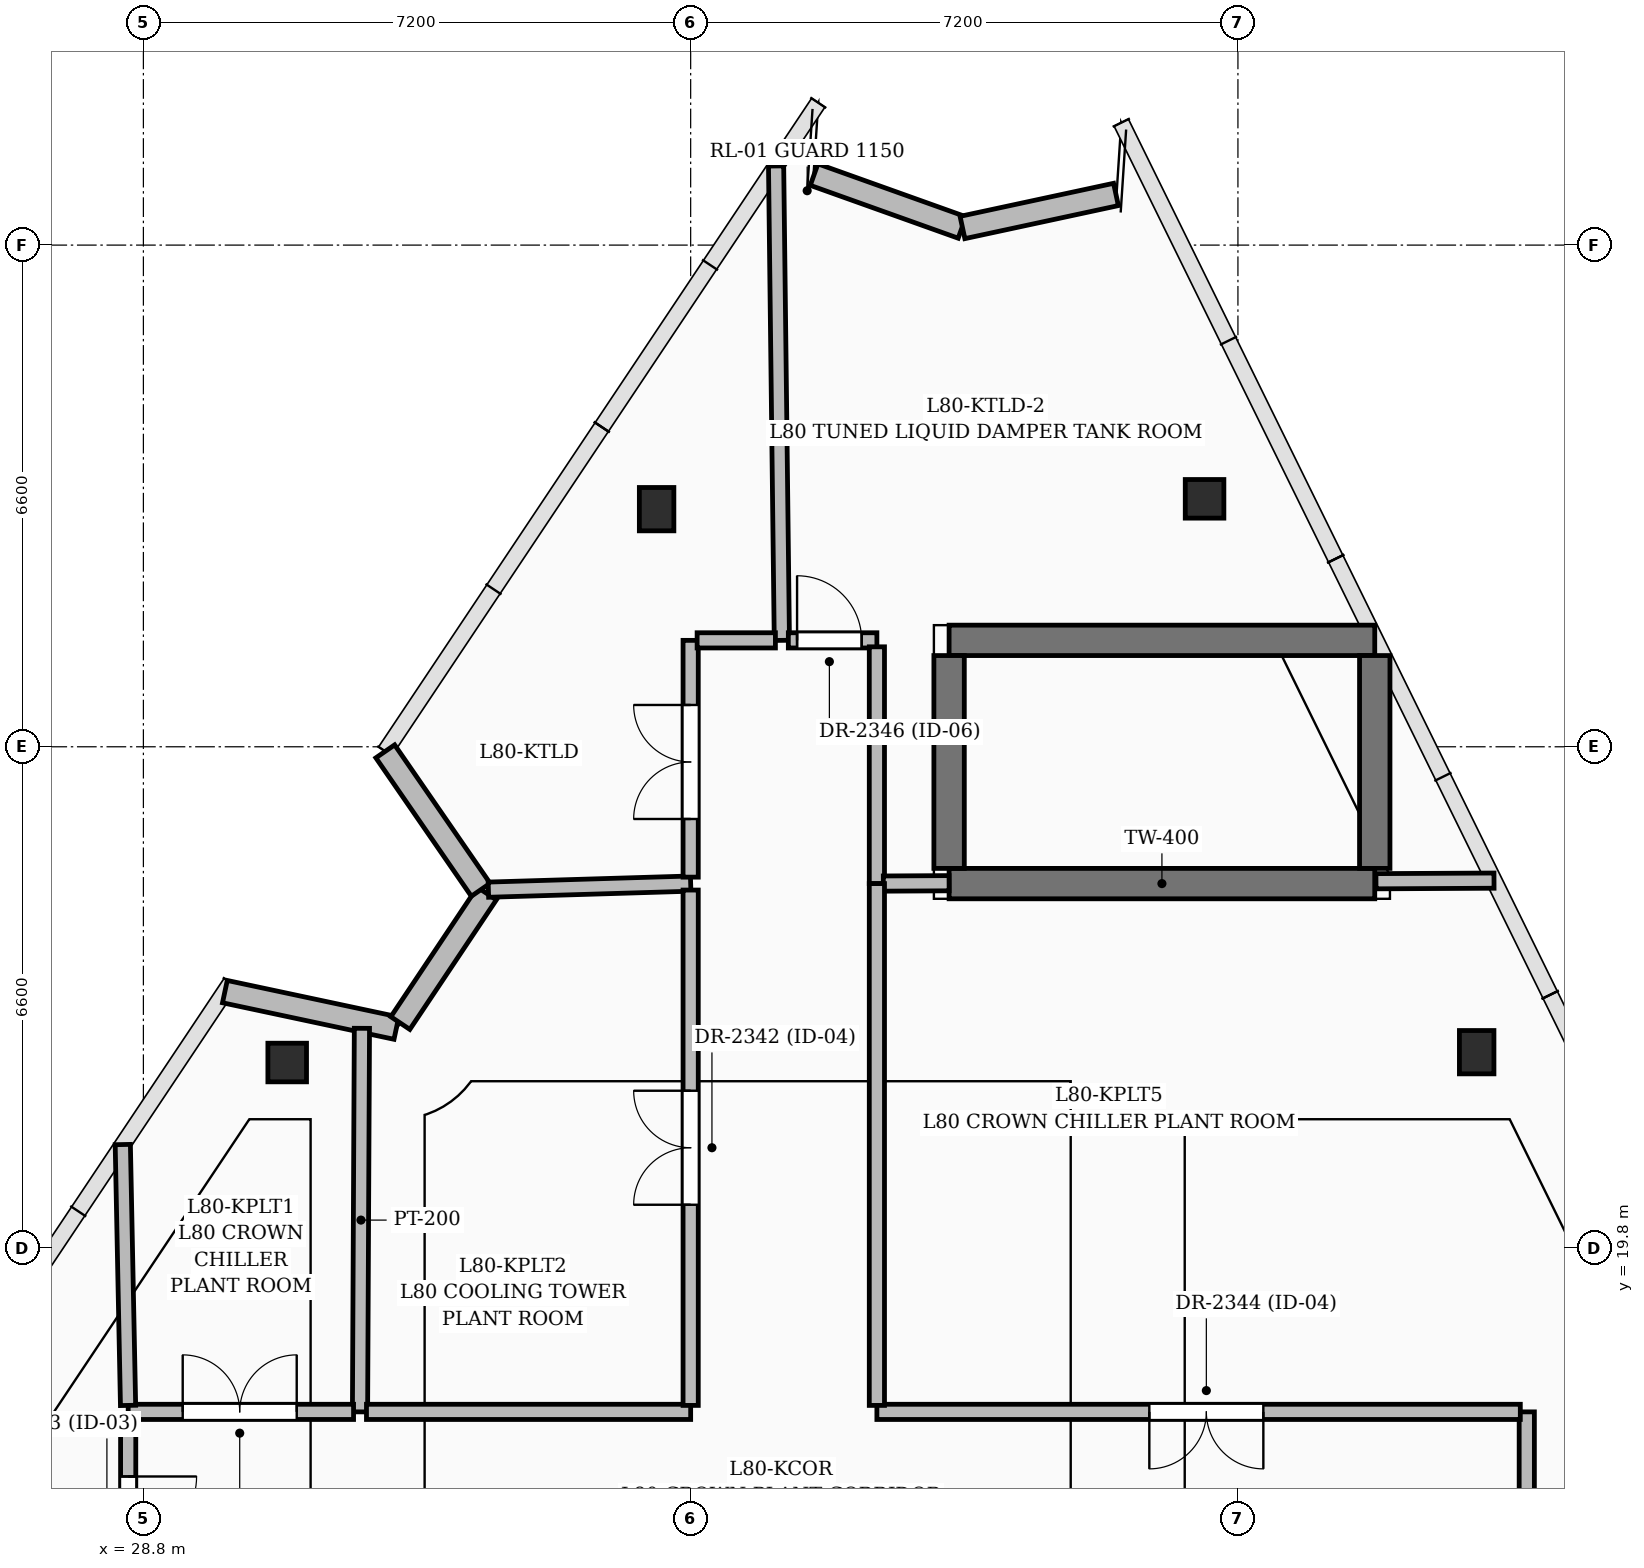
"""IFC4 building model, lengths in metres.
Left out: names, types, materials, properties, quantities, classifications, styles, units other than length and angle.
Written with IfcOpenShell. Run it as: python <this file> out.ifc"""

import sys

from ifc_helpers import new_model, si_unit, direction, frame, frame_2d, origin, origin_2d, place, context, subcontext, project, spatial, rectangle, hollow_circle, i_section, extrude, element, fill, save


model = new_model("IFC4")
c1 = context("Model", 3, precision=1e-05, world=origin(), true_north=direction((0.0, 1.0)))
c2 = subcontext(c1, "Body", "Model", "MODEL_VIEW")
j1 = project(units=[si_unit("LENGTHUNIT", "METRE"), si_unit("PLANEANGLEUNIT", "RADIAN")], contexts=[c1])
p1 = place(None, origin())
s1 = spatial("IfcSite", under=j1, at=p1, CompositionType="ELEMENT")
p2 = place(p1, origin())
s2 = spatial("IfcBuilding", under=s1, at=p2, CompositionType="ELEMENT")
p3 = place(p2, frame((0.0, 0.0, 310.5)))
s3 = spatial("IfcBuildingStorey", under=s2, at=p3, CompositionType="ELEMENT", Elevation=310.5)
p4 = place(p3, frame((46.341, 22.382, 0.0), z_axis=(0.0, 0.0, 1.0), x_axis=(1.0, 0.0, 0.0)))
e1 = element("IfcColumn", 1, at=p4, inside=s3, PredefinedType="COLUMN", context=c2, shape_type="SweptSolid", body=[
    extrude(i_section(OverallWidth=0.454, OverallDepth=0.57, WebThickness=0.078, FlangeThickness=0.094, FilletRadius=0.02, at=origin_2d()), origin(), (0.0, 0.0, 1.0), 4.0),
])
p5 = place(p3, frame((42.761, 29.662, 0.0), z_axis=(0.0, 0.0, 1.0), x_axis=(1.0, 0.0, 0.0)))
e2 = element("IfcColumn", 2, at=p5, inside=s3, PredefinedType="COLUMN", context=c2, shape_type="SweptSolid", body=[
    extrude(hollow_circle(Radius=0.254, WallThickness=0.016, at=origin_2d()), origin(), (0.0, 0.0, 1.0), 4.0),
])
p6 = place(p3, frame((35.552, 29.526, 0.0), z_axis=(0.0, 0.0, 1.0), x_axis=(1.0, 0.0, 0.0)))
e3 = element("IfcColumn", 3, at=p6, inside=s3, PredefinedType="COLUMN", context=c2, shape_type="SweptSolid", body=[
    extrude(i_section(OverallWidth=0.454, OverallDepth=0.57, WebThickness=0.078, FlangeThickness=0.094, FilletRadius=0.02, at=origin_2d()), origin(), (0.0, 0.0, 1.0), 4.0),
])
p7 = place(p3, frame((30.692, 22.246, 0.0), z_axis=(0.0, 0.0, 1.0), x_axis=(1.0, 0.0, 0.0)))
e4 = element("IfcColumn", 4, at=p7, inside=s3, PredefinedType="COLUMN", context=c2, shape_type="SweptSolid", body=[
    extrude(hollow_circle(Radius=0.254, WallThickness=0.016, at=origin_2d()), origin(), (0.0, 0.0, 1.0), 4.0),
])
for number, where, z_axis, x_axis in (
    (5, (39.4, 24.6, 0.15), (0.0, 0.0, 1.0), (1.0, 0.0, 0.0)),
    (6, (39.4, 27.8, 0.15), (0.0, 0.0, 1.0), (1.0, 0.0, 0.0)),
):
    element("IfcWall", number, at=place(p3, frame(where, z_axis=z_axis, x_axis=x_axis)), inside=s3, PredefinedType="SHEAR", context=c2, shape_type="SweptSolid", body=[
        extrude(rectangle(XDim=5.6, YDim=0.4, at=frame_2d((2.8, 0.0))), origin(), (0.0, 0.0, 1.0), 2.2),
    ])
for number, where, z_axis, x_axis in (
    (7, (39.4, 24.8, 0.15), (0.0, 0.0, 1.0), (0.0, 1.0, 0.0)),
    (8, (45.0, 24.8, 0.15), (0.0, 0.0, 1.0), (0.0, 1.0, 0.0)),
):
    element("IfcWall", number, at=place(p3, frame(where, z_axis=z_axis, x_axis=x_axis)), inside=s3, PredefinedType="SHEAR", context=c2, shape_type="SweptSolid", body=[
        extrude(rectangle(XDim=2.8, YDim=0.4, at=frame_2d((1.4, 0.0))), origin(), (0.0, 0.0, 1.0), 2.2),
    ])
p8 = place(p3, frame((29.872, 23.179, 0.0), z_axis=(0.0, 0.0, 1.0), x_axis=(0.978066490773, -0.208292917849, 0.0)))
e9 = element("IfcWall", 9, at=p8, inside=s3, PredefinedType="SOLIDWALL", context=c2, shape_type="SweptSolid", body=[
    extrude(rectangle(XDim=2.307, YDim=0.3, at=frame_2d((1.153, 0.0))), origin(), (0.0, 0.0, 1.0), 2.982),
])
p9 = place(p3, frame((32.18, 22.765, 0.0), z_axis=(0.0, 0.0, 1.0), x_axis=(0.555442165544, 0.831555169989, 0.0)))
e10 = element("IfcWall", 10, at=p9, inside=s3, PredefinedType="SOLIDWALL", context=c2, shape_type="SweptSolid", body=[
    extrude(rectangle(XDim=2.05, YDim=0.3, at=frame_2d((1.025, 0.0))), origin(), (0.0, 0.0, 1.0), 3.7),
])
p10 = place(p3, frame((33.238, 24.519, 0.0), z_axis=(0.0, 0.0, 1.0), x_axis=(-0.567797426526, 0.823168319623, 0.0)))
e11 = element("IfcWall", 11, at=p10, inside=s3, PredefinedType="SOLIDWALL", context=c2, shape_type="SweptSolid", body=[
    extrude(rectangle(XDim=2.212, YDim=0.3, at=frame_2d((1.106, 0.0))), origin(), (0.0, 0.0, 1.0), 2.982),
])
p11 = place(p3, frame((37.624, 33.927, 0.0), z_axis=(0.0, 0.0, 1.0), x_axis=(0.941672407687, -0.336530944493, 0.0)))
e12 = element("IfcWall", 12, at=p11, inside=s3, PredefinedType="SOLIDWALL", context=c2, shape_type="SweptSolid", body=[
    extrude(rectangle(XDim=2.067, YDim=0.3, at=frame_2d((1.033, 0.0))), origin(), (0.0, 0.0, 1.0), 3.7),
])
p12 = place(p3, frame((39.576, 33.232, 0.0), z_axis=(0.0, 0.0, 1.0), x_axis=(0.977608338725, 0.210432735227, 0.0)))
e13 = element("IfcWall", 13, at=p12, inside=s3, PredefinedType="SOLIDWALL", context=c2, shape_type="SweptSolid", body=[
    extrude(rectangle(XDim=2.066, YDim=0.3, at=frame_2d((1.033, 0.0))), origin(), (0.0, 0.0, 1.0), 3.7),
])
p13 = place(p3, frame((31.65, 17.65, 0.0), z_axis=(0.0, 0.0, 1.0), x_axis=(0.004983246461, 0.99998758355, 0.0)))
e14 = element("IfcWall", 14, at=p13, inside=s3, PredefinedType="PARTITIONING", context=c2, shape_type="SweptSolid", body=[
    extrude(rectangle(XDim=5.046, YDim=0.2, at=frame_2d((2.523, 0.0))), origin(), (0.0, 0.0, 1.0), 3.7),
])
p14 = place(p3, frame((28.6, 17.65, 0.0), z_axis=(0.0, 0.0, 1.0), x_axis=(1.0, 0.0, 0.0)))
e15 = element("IfcWall", 15, at=p14, inside=s3, PredefinedType="PARTITIONING", context=c2, shape_type="SweptSolid", body=[
    extrude(rectangle(XDim=2.965, YDim=0.2, at=frame_2d((1.482, 0.0))), origin(), (0.0, 0.0, 1.0), 3.035),
])
p15 = place(p14, frame((0.717, 0.0, 0.0)))
e16 = element("IfcOpeningElement", 16, at=p15, cuts=e15, PredefinedType="OPENING", context=c2, shape_type="SweptSolid", body=[
    extrude(rectangle(XDim=1.5, YDim=2.2, at=frame_2d((0.75, 1.1))), frame((0.0, 0.11, 0.0), z_axis=(0.0, -1.0, 0.0), x_axis=(1.0, 0.0, 0.0)), (0.0, 0.0, 1.0), 0.22),
])
p16 = place(p3, frame((28.529, 21.167, 0.0), z_axis=(0.0, 0.0, 1.0), x_axis=(0.020199335294, -0.999795972613, 0.0)))
e17 = element("IfcWall", 17, at=p16, inside=s3, PredefinedType="PARTITIONING", context=c2, shape_type="SweptSolid", body=[
    extrude(rectangle(XDim=3.433, YDim=0.2, at=frame_2d((1.716, 0.0))), origin(), (0.0, 0.0, 1.0), 2.977),
])
p17 = place(p3, frame((33.339, 24.52, 0.0), z_axis=(0.0, 0.0, 1.0), x_axis=(0.999547467776, 0.03008088535, 0.0)))
e18 = element("IfcWall", 18, at=p17, inside=s3, PredefinedType="PARTITIONING", context=c2, shape_type="SweptSolid", body=[
    extrude(rectangle(XDim=2.662, YDim=0.2, at=frame_2d((1.331, 0.0))), origin(), (0.0, 0.0, 1.0), 3.035),
])
p18 = place(p3, frame((37.2, 27.8, 0.0), z_axis=(0.0, 0.0, 1.0), x_axis=(-0.012165120943, 0.999926002178, 0.0)))
e19 = element("IfcWall", 19, at=p18, inside=s3, PredefinedType="PARTITIONING", context=c2, shape_type="SweptSolid", body=[
    extrude(rectangle(XDim=6.241, YDim=0.2, at=frame_2d((3.121, 0.0))), origin(), (0.0, 0.0, 1.0), 2.977),
])
p19 = place(p3, frame((36.0, 24.685, 0.0), z_axis=(0.0, 0.0, 1.0), x_axis=(0.0, 1.0, 0.0)))
e20 = element("IfcWall", 20, at=p19, inside=s3, PredefinedType="PARTITIONING", context=c2, shape_type="SweptSolid", body=[
    extrude(rectangle(XDim=3.115, YDim=0.2, at=frame_2d((1.558, 0.0))), origin(), (0.0, 0.0, 1.0), 3.21),
])
p20 = place(p19, frame((0.765, 0.0, 0.0)))
e21 = element("IfcOpeningElement", 21, at=p20, cuts=e20, PredefinedType="OPENING", context=c2, shape_type="SweptSolid", body=[
    extrude(rectangle(XDim=1.5, YDim=2.2, at=frame_2d((0.75, 1.1))), frame((0.0, 0.11, 0.0), z_axis=(0.0, -1.0, 0.0), x_axis=(1.0, 0.0, 0.0)), (0.0, 0.0, 1.0), 0.22),
])
p21 = place(p3, frame((36.085, 27.8, 0.0), z_axis=(0.0, 0.0, 1.0), x_axis=(1.0, 0.0, 0.0)))
e22 = element("IfcWall", 22, at=p21, inside=s3, PredefinedType="PARTITIONING", context=c2, shape_type="SweptSolid", body=[
    extrude(rectangle(XDim=1.03, YDim=0.2, at=frame_2d((0.515, 0.0))), origin(), (0.0, 0.0, 1.0), 3.7),
])
p22 = place(p3, frame((31.735, 17.65, 0.0), z_axis=(0.0, 0.0, 1.0), x_axis=(1.0, 0.0, 0.0)))
e23 = element("IfcWall", 23, at=p22, inside=s3, PredefinedType="PARTITIONING", context=c2, shape_type="SweptSolid", body=[
    extrude(rectangle(XDim=4.265, YDim=0.2, at=frame_2d((2.132, 0.0))), origin(), (0.0, 0.0, 1.0), 3.035),
])
p23 = place(p3, frame((36.0, 17.735, 0.0), z_axis=(0.0, 0.0, 1.0), x_axis=(0.0, 1.0, 0.0)))
e24 = element("IfcWall", 24, at=p23, inside=s3, PredefinedType="PARTITIONING", context=c2, shape_type="SweptSolid", body=[
    extrude(rectangle(XDim=6.78, YDim=0.2, at=frame_2d((3.39, 0.0))), origin(), (0.0, 0.0, 1.0), 3.21),
])
p24 = place(p23, frame((2.64, 0.0, 0.0)))
e25 = element("IfcOpeningElement", 25, at=p24, cuts=e24, PredefinedType="OPENING", context=c2, shape_type="SweptSolid", body=[
    extrude(rectangle(XDim=1.5, YDim=2.2, at=frame_2d((0.75, 1.1))), frame((0.0, 0.11, 0.0), z_axis=(0.0, -1.0, 0.0), x_axis=(1.0, 0.0, 0.0)), (0.0, 0.0, 1.0), 0.22),
])
p25 = place(p3, frame((37.285, 27.8, 0.0), z_axis=(0.0, 0.0, 1.0), x_axis=(1.0, 0.0, 0.0)))
e26 = element("IfcWall", 26, at=p25, inside=s3, PredefinedType="PARTITIONING", context=c2, shape_type="SweptSolid", body=[
    extrude(rectangle(XDim=1.165, YDim=0.2, at=frame_2d((0.583, 0.0))), origin(), (0.0, 0.0, 1.0), 3.7),
])
p26 = place(p25, frame((0.115, 0.0, 0.0)))
e27 = element("IfcOpeningElement", 27, at=p26, cuts=e26, PredefinedType="OPENING", context=c2, shape_type="SweptSolid", body=[
    extrude(rectangle(XDim=0.85, YDim=2.1, at=frame_2d((0.425, 1.05))), frame((0.0, 0.11, 0.0), z_axis=(0.0, -1.0, 0.0), x_axis=(1.0, 0.0, 0.0)), (0.0, 0.0, 1.0), 0.22),
])
p27 = place(p3, frame((38.45, 27.715, 0.0), z_axis=(0.0, 0.0, 1.0), x_axis=(0.0, -1.0, 0.0)))
e28 = element("IfcWall", 28, at=p27, inside=s3, PredefinedType="PARTITIONING", context=c2, shape_type="SweptSolid", body=[
    extrude(rectangle(XDim=3.115, YDim=0.2, at=frame_2d((1.558, 0.0))), origin(), (0.0, 0.0, 1.0), 3.21),
])
p28 = place(p3, frame((38.535, 24.6, 0.0), z_axis=(0.0, 0.0, 1.0), x_axis=(0.999985621104, 0.005362609879, 0.0)))
e29 = element("IfcWall", 29, at=p28, inside=s3, PredefinedType="PARTITIONING", context=c2, shape_type="SweptSolid", body=[
    extrude(rectangle(XDim=0.865, YDim=0.2, at=frame_2d((0.433, 0.0))), origin(), (0.0, 0.0, 1.0), 2.977),
])
p29 = place(p3, frame((28.6, 17.565, 0.0), z_axis=(0.0, 0.0, 1.0), x_axis=(0.0, -1.0, 0.0)))
e30 = element("IfcWall", 30, at=p29, inside=s3, PredefinedType="PARTITIONING", context=c2, shape_type="SweptSolid", body=[
    extrude(rectangle(XDim=2.515, YDim=0.2, at=frame_2d((1.257, 0.0))), origin(), (0.0, 0.0, 1.0), 3.035),
])
p30 = place(p29, frame((0.765, 0.0, 0.0)))
e31 = element("IfcOpeningElement", 31, at=p30, cuts=e30, PredefinedType="OPENING", context=c2, shape_type="SweptSolid", body=[
    extrude(rectangle(XDim=0.9, YDim=2.1, at=frame_2d((0.45, 1.05))), frame((0.0, 0.11, 0.0), z_axis=(0.0, -1.0, 0.0), x_axis=(1.0, 0.0, 0.0)), (0.0, 0.0, 1.0), 0.22),
])
p31 = place(p3, frame((47.0, 15.05, 0.0), z_axis=(0.0, 0.0, 1.0), x_axis=(0.0, 1.0, 0.0)))
e32 = element("IfcWall", 32, at=p31, inside=s3, PredefinedType="PARTITIONING", context=c2, shape_type="SweptSolid", body=[
    extrude(rectangle(XDim=2.6, YDim=0.2, at=frame_2d((1.3, 0.0))), origin(), (0.0, 0.0, 1.0), 3.035),
])
p32 = place(p3, frame((46.915, 17.65, 0.0), z_axis=(0.0, 0.0, 1.0), x_axis=(-1.0, 0.0, 0.0)))
e33 = element("IfcWall", 33, at=p32, inside=s3, PredefinedType="PARTITIONING", context=c2, shape_type="SweptSolid", body=[
    extrude(rectangle(XDim=8.465, YDim=0.2, at=frame_2d((4.232, 0.0))), origin(), (0.0, 0.0, 1.0), 3.035),
])
p33 = place(p32, frame((3.381, 0.0, 0.0)))
e34 = element("IfcOpeningElement", 34, at=p33, cuts=e33, PredefinedType="OPENING", context=c2, shape_type="SweptSolid", body=[
    extrude(rectangle(XDim=1.5, YDim=2.2, at=frame_2d((0.75, 1.1))), frame((0.0, 0.11, 0.0), z_axis=(0.0, -1.0, 0.0), x_axis=(1.0, 0.0, 0.0)), (0.0, 0.0, 1.0), 0.22),
])
p34 = place(p3, frame((38.45, 17.735, 0.0), z_axis=(0.0, 0.0, 1.0), x_axis=(0.0, 1.0, 0.0)))
e35 = element("IfcWall", 35, at=p34, inside=s3, PredefinedType="PARTITIONING", context=c2, shape_type="SweptSolid", body=[
    extrude(rectangle(XDim=6.865, YDim=0.2, at=frame_2d((3.433, 0.0))), origin(), (0.0, 0.0, 1.0), 3.035),
])
p35 = place(p3, frame((45.016, 24.631, 0.0), z_axis=(0.0, 0.0, 1.0), x_axis=(0.999987346493, 0.005030591902, 0.0)))
e36 = element("IfcWall", 36, at=p35, inside=s3, PredefinedType="PARTITIONING", context=c2, shape_type="SweptSolid", body=[
    extrude(rectangle(XDim=1.553, YDim=0.2, at=frame_2d((0.776, 0.0))), origin(), (0.0, 0.0, 1.0), 2.977),
])
p36 = place(p15, origin())
e37 = element("IfcDoor", 37, at=p36, inside=s3, OperationType="DOUBLE_DOOR_SINGLE_SWING", PredefinedType="DOOR", context=c2, shape_type="SweptSolid", body=[
    extrude(rectangle(XDim=1.5, YDim=2.2, at=frame_2d((0.75, 1.1))), frame((0.0, 0.025, 0.0), z_axis=(0.0, -1.0, 0.0), x_axis=(1.0, 0.0, 0.0)), (0.0, 0.0, 1.0), 0.05),
])
fill(e16, e37)
p37 = place(p24, origin())
e38 = element("IfcDoor", 38, at=p37, inside=s3, OperationType="DOUBLE_DOOR_SINGLE_SWING", PredefinedType="DOOR", context=c2, shape_type="SweptSolid", body=[
    extrude(rectangle(XDim=1.5, YDim=2.2, at=frame_2d((0.75, 1.1))), frame((0.0, 0.025, 0.0), z_axis=(0.0, -1.0, 0.0), x_axis=(1.0, 0.0, 0.0)), (0.0, 0.0, 1.0), 0.05),
])
fill(e25, e38)
p38 = place(p30, origin())
e39 = element("IfcDoor", 39, at=p38, inside=s3, OperationType="SINGLE_SWING_LEFT", PredefinedType="DOOR", context=c2, shape_type="SweptSolid", body=[
    extrude(rectangle(XDim=0.9, YDim=2.1, at=frame_2d((0.45, 1.05))), frame((0.0, 0.025, 0.0), z_axis=(0.0, -1.0, 0.0), x_axis=(1.0, 0.0, 0.0)), (0.0, 0.0, 1.0), 0.05),
])
fill(e31, e39)
p39 = place(p33, origin())
e40 = element("IfcDoor", 40, at=p39, inside=s3, OperationType="DOUBLE_DOOR_SINGLE_SWING", PredefinedType="DOOR", context=c2, shape_type="SweptSolid", body=[
    extrude(rectangle(XDim=1.5, YDim=2.2, at=frame_2d((0.75, 1.1))), frame((0.0, 0.025, 0.0), z_axis=(0.0, -1.0, 0.0), x_axis=(1.0, 0.0, 0.0)), (0.0, 0.0, 1.0), 0.05),
])
fill(e34, e40)
p40 = place(p20, origin())
e41 = element("IfcDoor", 41, at=p40, inside=s3, OperationType="DOUBLE_DOOR_SINGLE_SWING", PredefinedType="DOOR", context=c2, shape_type="SweptSolid", body=[
    extrude(rectangle(XDim=1.5, YDim=2.2, at=frame_2d((0.75, 1.1))), frame((0.0, 0.025, 0.0), z_axis=(0.0, -1.0, 0.0), x_axis=(1.0, 0.0, 0.0)), (0.0, 0.0, 1.0), 0.05),
])
fill(e21, e41)
p41 = place(p26, origin())
e42 = element("IfcDoor", 42, at=p41, inside=s3, OperationType="SINGLE_SWING_LEFT", PredefinedType="DOOR", context=c2, shape_type="SweptSolid", body=[
    extrude(rectangle(XDim=0.85, YDim=2.1, at=frame_2d((0.425, 1.05))), frame((0.0, 0.025, 0.0), z_axis=(0.0, -1.0, 0.0), x_axis=(1.0, 0.0, 0.0)), (0.0, 0.0, 1.0), 0.05),
])
fill(e27, e42)
save(model, sys.argv[1])
